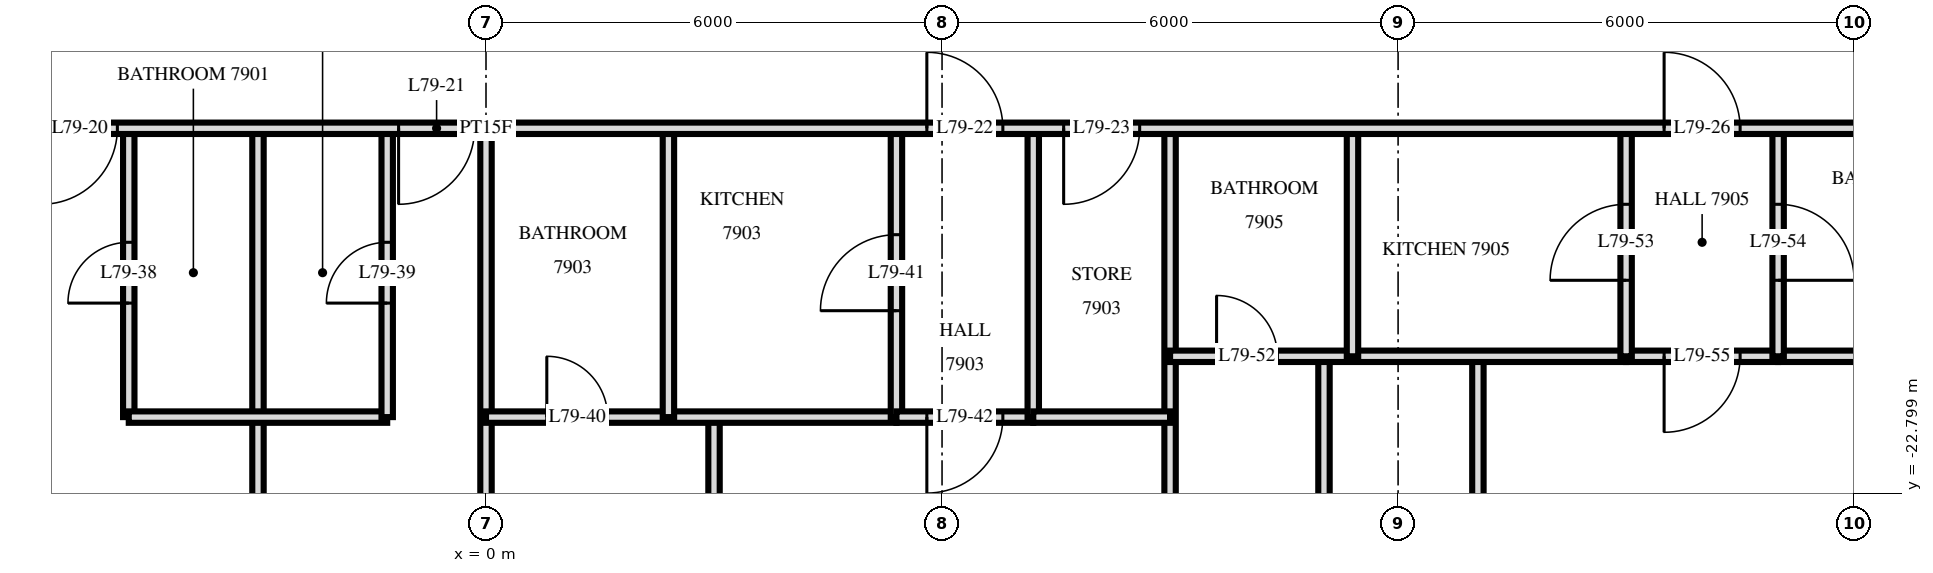
"""IFC4 building model, lengths in metres.
Left out: names, types, materials, properties, quantities, classifications, styles, units other than length and angle.
Written with IfcOpenShell. Run it as: python <this file> out.ifc"""

import sys

from ifc_helpers import new_model, si_unit, direction, frame, frame_2d, origin, place, context, subcontext, project, spatial, rectangle, extrude, element, fill, save


model = new_model("IFC4")
c1 = context("Model", 3, precision=1e-05, world=origin(), true_north=direction((0.0, 1.0)))
c2 = subcontext(c1, "Body", "Model", "MODEL_VIEW")
j1 = project(units=[si_unit("LENGTHUNIT", "METRE"), si_unit("PLANEANGLEUNIT", "RADIAN")], contexts=[c1])
p1 = place(None, origin())
s1 = spatial("IfcSite", under=j1, at=p1, CompositionType="ELEMENT")
p2 = place(p1, origin())
s2 = spatial("IfcBuilding", under=s1, at=p2, CompositionType="ELEMENT")
p3 = place(p2, frame((0.0, 0.0, 298.1)))
s3 = spatial("IfcBuildingStorey", under=s2, at=p3, CompositionType="ELEMENT", Elevation=298.1)
p4 = place(p3, frame((17.0, -21.0, 0.0), z_axis=(0.0, 0.0, 1.0), x_axis=(0.0, 1.0, 0.0)))
e1 = element("IfcWall", 1, at=p4, inside=s3, PredefinedType="PARTITIONING", context=c2, shape_type="SweptSolid", body=[
    extrude(rectangle(XDim=3.0, YDim=0.15, at=frame_2d((1.5, 0.0))), origin(), (0.0, 0.0, 1.0), 3.22),
])
p5 = place(p4, frame((1.0, 0.0, 0.0)))
e2 = element("IfcOpeningElement", 2, at=p5, cuts=e1, PredefinedType="OPENING", context=c2, shape_type="SweptSolid", body=[
    extrude(rectangle(XDim=1.0, YDim=2.1, at=frame_2d((0.5, 1.05))), frame((0.0, 0.085, 0.0), z_axis=(0.0, -1.0, 0.0), x_axis=(1.0, 0.0, 0.0)), (0.0, 0.0, 1.0), 0.17),
])
p6 = place(p3, frame((15.0, -21.0, 0.0), z_axis=(0.0, 0.0, 1.0), x_axis=(0.0, 1.0, 0.0)))
e3 = element("IfcWall", 3, at=p6, inside=s3, PredefinedType="PARTITIONING", context=c2, shape_type="SweptSolid", body=[
    extrude(rectangle(XDim=3.0, YDim=0.15, at=frame_2d((1.5, 0.0))), origin(), (0.0, 0.0, 1.0), 3.22),
])
p7 = place(p6, frame((1.0, 0.0, 0.0)))
e4 = element("IfcOpeningElement", 4, at=p7, cuts=e3, PredefinedType="OPENING", context=c2, shape_type="SweptSolid", body=[
    extrude(rectangle(XDim=1.0, YDim=2.1, at=frame_2d((0.5, 1.05))), frame((0.0, 0.085, 0.0), z_axis=(0.0, -1.0, 0.0), x_axis=(1.0, 0.0, 0.0)), (0.0, 0.0, 1.0), 0.17),
])
p8 = place(p3, frame((13.05, -33.62, 0.0), z_axis=(0.0, 0.0, 1.0), x_axis=(0.0, 1.0, 0.0)))
e5 = element("IfcWall", 5, at=p8, inside=s3, PredefinedType="PARTITIONING", context=c2, shape_type="SweptSolid", body=[
    extrude(rectangle(XDim=12.62, YDim=0.15, at=frame_2d((6.31, 0.0))), origin(), (0.0, 0.0, 1.0), 3.22),
])
p9 = place(p8, frame((5.79, 0.0, 0.0)))
e6 = element("IfcOpeningElement", 6, at=p9, cuts=e5, PredefinedType="OPENING", context=c2, shape_type="SweptSolid", body=[
    extrude(rectangle(XDim=0.9, YDim=2.1, at=frame_2d((0.45, 1.05))), frame((0.0, 0.085, 0.0), z_axis=(0.0, -1.0, 0.0), x_axis=(1.0, 0.0, 0.0)), (0.0, 0.0, 1.0), 0.17),
])
p10 = place(p3, frame((11.4, -21.0, 0.0), z_axis=(0.0, 0.0, 1.0), x_axis=(0.0, 1.0, 0.0)))
e7 = element("IfcWall", 7, at=p10, inside=s3, PredefinedType="PARTITIONING", context=c2, shape_type="SweptSolid", body=[
    extrude(rectangle(XDim=3.0, YDim=0.15, at=frame_2d((1.5, 0.0))), origin(), (0.0, 0.0, 1.0), 3.22),
])
p11 = place(p3, frame((11.025, -33.62, 0.0), z_axis=(0.0, 0.0, 1.0), x_axis=(0.0, 1.0, 0.0)))
e8 = element("IfcWall", 8, at=p11, inside=s3, PredefinedType="PARTITIONING", context=c2, shape_type="SweptSolid", body=[
    extrude(rectangle(XDim=12.62, YDim=0.15, at=frame_2d((6.31, 0.0))), origin(), (0.0, 0.0, 1.0), 3.22),
])
p12 = place(p11, frame((5.79, 0.0, 0.0)))
e9 = element("IfcOpeningElement", 9, at=p12, cuts=e8, PredefinedType="OPENING", context=c2, shape_type="SweptSolid", body=[
    extrude(rectangle(XDim=0.9, YDim=2.1, at=frame_2d((0.45, 1.05))), frame((0.0, 0.085, 0.0), z_axis=(0.0, -1.0, 0.0), x_axis=(1.0, 0.0, 0.0)), (0.0, 0.0, 1.0), 0.17),
])
p13 = place(p3, frame((9.0, -33.62, 0.0), z_axis=(0.0, 0.0, 1.0), x_axis=(0.0, 1.0, 0.0)))
e10 = element("IfcWall", 10, at=p13, inside=s3, PredefinedType="PARTITIONING", context=c2, shape_type="SweptSolid", body=[
    extrude(rectangle(XDim=15.62, YDim=0.15, at=frame_2d((7.81, 0.0))), origin(), (0.0, 0.0, 1.0), 3.22),
])
p14 = place(p3, frame((7.2, -21.8, 0.0), z_axis=(0.0, 0.0, 1.0), x_axis=(0.0, 1.0, 0.0)))
e11 = element("IfcWall", 11, at=p14, inside=s3, PredefinedType="PARTITIONING", context=c2, shape_type="SweptSolid", body=[
    extrude(rectangle(XDim=3.8, YDim=0.15, at=frame_2d((1.9, 0.0))), origin(), (0.0, 0.0, 1.0), 3.22),
])
p15 = place(p3, frame((5.4, -21.8, 0.0), z_axis=(0.0, 0.0, 1.0), x_axis=(0.0, 1.0, 0.0)))
e12 = element("IfcWall", 12, at=p15, inside=s3, PredefinedType="PARTITIONING", context=c2, shape_type="SweptSolid", body=[
    extrude(rectangle(XDim=3.8, YDim=0.15, at=frame_2d((1.9, 0.0))), origin(), (0.0, 0.0, 1.0), 3.22),
])
p16 = place(p15, frame((1.4, 0.0, 0.0)))
e13 = element("IfcOpeningElement", 13, at=p16, cuts=e12, PredefinedType="OPENING", context=c2, shape_type="SweptSolid", body=[
    extrude(rectangle(XDim=1.0, YDim=2.1, at=frame_2d((0.5, 1.05))), frame((0.0, 0.085, 0.0), z_axis=(0.0, -1.0, 0.0), x_axis=(1.0, 0.0, 0.0)), (0.0, 0.0, 1.0), 0.17),
])
p17 = place(p3, frame((3.0, -33.62, 0.0), z_axis=(0.0, 0.0, 1.0), x_axis=(0.0, 1.0, 0.0)))
e14 = element("IfcWall", 14, at=p17, inside=s3, PredefinedType="PARTITIONING", context=c2, shape_type="SweptSolid", body=[
    extrude(rectangle(XDim=11.82, YDim=0.15, at=frame_2d((5.91, 0.0))), origin(), (0.0, 0.0, 1.0), 3.22),
])
p18 = place(p17, frame((5.37, 0.0, 0.0)))
e15 = element("IfcOpeningElement", 15, at=p18, cuts=e14, PredefinedType="OPENING", context=c2, shape_type="SweptSolid", body=[
    extrude(rectangle(XDim=0.9, YDim=2.1, at=frame_2d((0.45, 1.05))), frame((0.0, 0.085, 0.0), z_axis=(0.0, -1.0, 0.0), x_axis=(1.0, 0.0, 0.0)), (0.0, 0.0, 1.0), 0.17),
])
p19 = place(p3, frame((2.4, -21.8, 0.0), z_axis=(0.0, 0.0, 1.0), x_axis=(0.0, 1.0, 0.0)))
e16 = element("IfcWall", 16, at=p19, inside=s3, PredefinedType="PARTITIONING", context=c2, shape_type="SweptSolid", body=[
    extrude(rectangle(XDim=3.8, YDim=0.15, at=frame_2d((1.9, 0.0))), origin(), (0.0, 0.0, 1.0), 3.22),
])
p20 = place(p3, frame((0.0, -33.62, 0.0), z_axis=(0.0, 0.0, 1.0), x_axis=(0.0, 1.0, 0.0)))
e17 = element("IfcWall", 17, at=p20, inside=s3, PredefinedType="PARTITIONING", context=c2, shape_type="SweptSolid", body=[
    extrude(rectangle(XDim=15.62, YDim=0.15, at=frame_2d((7.81, 0.0))), origin(), (0.0, 0.0, 1.0), 3.22),
])
p21 = place(p3, frame((-1.3, -21.8, 0.0), z_axis=(0.0, 0.0, 1.0), x_axis=(0.0, 1.0, 0.0)))
e18 = element("IfcWall", 18, at=p21, inside=s3, PredefinedType="PARTITIONING", context=c2, shape_type="SweptSolid", body=[
    extrude(rectangle(XDim=3.8, YDim=0.15, at=frame_2d((1.9, 0.0))), origin(), (0.0, 0.0, 1.0), 3.22),
])
p22 = place(p21, frame((1.5, 0.0, 0.0)))
e19 = element("IfcOpeningElement", 19, at=p22, cuts=e18, PredefinedType="OPENING", context=c2, shape_type="SweptSolid", body=[
    extrude(rectangle(XDim=0.8, YDim=2.1, at=frame_2d((0.4, 1.05))), frame((0.0, 0.085, 0.0), z_axis=(0.0, -1.0, 0.0), x_axis=(1.0, 0.0, 0.0)), (0.0, 0.0, 1.0), 0.17),
])
p23 = place(p3, frame((-3.0, -33.62, 0.0), z_axis=(0.0, 0.0, 1.0), x_axis=(0.0, 1.0, 0.0)))
e20 = element("IfcWall", 20, at=p23, inside=s3, PredefinedType="PARTITIONING", context=c2, shape_type="SweptSolid", body=[
    extrude(rectangle(XDim=15.62, YDim=0.15, at=frame_2d((7.81, 0.0))), origin(), (0.0, 0.0, 1.0), 3.22),
])
p24 = place(p3, frame((-4.7, -21.8, 0.0), z_axis=(0.0, 0.0, 1.0), x_axis=(0.0, 1.0, 0.0)))
e21 = element("IfcWall", 21, at=p24, inside=s3, PredefinedType="PARTITIONING", context=c2, shape_type="SweptSolid", body=[
    extrude(rectangle(XDim=3.8, YDim=0.15, at=frame_2d((1.9, 0.0))), origin(), (0.0, 0.0, 1.0), 3.22),
])
p25 = place(p24, frame((1.5, 0.0, 0.0)))
e22 = element("IfcOpeningElement", 22, at=p25, cuts=e21, PredefinedType="OPENING", context=c2, shape_type="SweptSolid", body=[
    extrude(rectangle(XDim=0.8, YDim=2.1, at=frame_2d((0.4, 1.05))), frame((0.0, 0.085, 0.0), z_axis=(0.0, -1.0, 0.0), x_axis=(1.0, 0.0, 0.0)), (0.0, 0.0, 1.0), 0.17),
])
p26 = place(p3, frame((5.4, -21.8, 0.0), z_axis=(0.0, 0.0, 1.0), x_axis=(1.0, 0.0, 0.0)))
e23 = element("IfcWall", 23, at=p26, inside=s3, PredefinedType="PARTITIONING", context=c2, shape_type="SweptSolid", body=[
    extrude(rectangle(XDim=1.8, YDim=0.15, at=frame_2d((0.9, 0.0))), origin(), (0.0, 0.0, 1.0), 3.22),
])
p27 = place(p26, frame((0.4, 0.0, 0.0)))
e24 = element("IfcOpeningElement", 24, at=p27, cuts=e23, PredefinedType="OPENING", context=c2, shape_type="SweptSolid", body=[
    extrude(rectangle(XDim=1.0, YDim=2.1, at=frame_2d((0.5, 1.05))), frame((0.0, 0.085, 0.0), z_axis=(0.0, -1.0, 0.0), x_axis=(1.0, 0.0, 0.0)), (0.0, 0.0, 1.0), 0.17),
])
p28 = place(p3, frame((-4.7, -21.8, 0.0), z_axis=(0.0, 0.0, 1.0), x_axis=(1.0, 0.0, 0.0)))
e25 = element("IfcWall", 25, at=p28, inside=s3, PredefinedType="PARTITIONING", context=c2, shape_type="SweptSolid", body=[
    extrude(rectangle(XDim=3.4, YDim=0.15, at=frame_2d((1.7, 0.0))), origin(), (0.0, 0.0, 1.0), 3.22),
])
p29 = place(p3, frame((0.0, -21.8, 0.0), z_axis=(0.0, 0.0, 1.0), x_axis=(1.0, 0.0, 0.0)))
e26 = element("IfcWall", 26, at=p29, inside=s3, PredefinedType="PARTITIONING", context=c2, shape_type="SweptSolid", body=[
    extrude(rectangle(XDim=5.4, YDim=0.15, at=frame_2d((2.7, 0.0))), origin(), (0.0, 0.0, 1.0), 3.22),
])
p30 = place(p29, frame((0.8, 0.0, 0.0)))
e27 = element("IfcOpeningElement", 27, at=p30, cuts=e26, PredefinedType="OPENING", context=c2, shape_type="SweptSolid", body=[
    extrude(rectangle(XDim=0.8, YDim=2.1, at=frame_2d((0.4, 1.05))), frame((0.0, 0.085, 0.0), z_axis=(0.0, -1.0, 0.0), x_axis=(1.0, 0.0, 0.0)), (0.0, 0.0, 1.0), 0.17),
])
p31 = place(p3, frame((7.2, -21.8, 0.0), z_axis=(0.0, 0.0, 1.0), x_axis=(1.0, 0.0, 0.0)))
e28 = element("IfcWall", 28, at=p31, inside=s3, PredefinedType="PARTITIONING", context=c2, shape_type="SweptSolid", body=[
    extrude(rectangle(XDim=1.8, YDim=0.15, at=frame_2d((0.9, 0.0))), origin(), (0.0, 0.0, 1.0), 3.22),
])
p32 = place(p3, frame((15.0, -21.0, 0.0), z_axis=(0.0, 0.0, 1.0), x_axis=(1.0, 0.0, 0.0)))
e29 = element("IfcWall", 29, at=p32, inside=s3, PredefinedType="PARTITIONING", context=c2, shape_type="SweptSolid", body=[
    extrude(rectangle(XDim=2.0, YDim=0.15, at=frame_2d((1.0, 0.0))), origin(), (0.0, 0.0, 1.0), 3.22),
])
p33 = place(p32, frame((0.5, 0.0, 0.0)))
e30 = element("IfcOpeningElement", 30, at=p33, cuts=e29, PredefinedType="OPENING", context=c2, shape_type="SweptSolid", body=[
    extrude(rectangle(XDim=1.0, YDim=2.1, at=frame_2d((0.5, 1.05))), frame((0.0, 0.085, 0.0), z_axis=(0.0, -1.0, 0.0), x_axis=(1.0, 0.0, 0.0)), (0.0, 0.0, 1.0), 0.17),
])
p34 = place(p3, frame((9.0, -21.0, 0.0), z_axis=(0.0, 0.0, 1.0), x_axis=(1.0, 0.0, 0.0)))
e31 = element("IfcWall", 31, at=p34, inside=s3, PredefinedType="PARTITIONING", context=c2, shape_type="SweptSolid", body=[
    extrude(rectangle(XDim=6.0, YDim=0.15, at=frame_2d((3.0, 0.0))), origin(), (0.0, 0.0, 1.0), 3.22),
])
p35 = place(p34, frame((0.612, 0.0, 0.0)))
e32 = element("IfcOpeningElement", 32, at=p35, cuts=e31, PredefinedType="OPENING", context=c2, shape_type="SweptSolid", body=[
    extrude(rectangle(XDim=0.8, YDim=2.1, at=frame_2d((0.4, 1.05))), frame((0.0, 0.085, 0.0), z_axis=(0.0, -1.0, 0.0), x_axis=(1.0, 0.0, 0.0)), (0.0, 0.0, 1.0), 0.17),
])
p36 = place(p3, frame((17.0, -21.0, 0.0), z_axis=(0.0, 0.0, 1.0), x_axis=(1.0, 0.0, 0.0)))
e33 = element("IfcWall", 33, at=p36, inside=s3, PredefinedType="PARTITIONING", context=c2, shape_type="SweptSolid", body=[
    extrude(rectangle(XDim=5.92, YDim=0.15, at=frame_2d((2.96, 0.0))), origin(), (0.0, 0.0, 1.0), 3.22),
])
p37 = place(p3, frame((-22.92, -18.0, 0.0), z_axis=(0.0, 0.0, 1.0), x_axis=(1.0, 0.0, 0.0)))
e34 = element("IfcWall", 34, at=p37, inside=s3, PredefinedType="PARTITIONING", context=c2, shape_type="SweptSolid", body=[
    extrude(rectangle(XDim=45.84, YDim=0.15, at=frame_2d((22.92, 0.0))), origin(), (0.0, 0.0, 1.0), 3.22),
])
p38 = place(p37, frame((17.07, 0.0, 0.0)))
e35 = element("IfcOpeningElement", 35, at=p38, cuts=e34, PredefinedType="OPENING", context=c2, shape_type="SweptSolid", body=[
    extrude(rectangle(XDim=1.0, YDim=2.1, at=frame_2d((0.5, 1.05))), frame((0.0, 0.085, 0.0), z_axis=(0.0, -1.0, 0.0), x_axis=(1.0, 0.0, 0.0)), (0.0, 0.0, 1.0), 0.17),
])
p39 = place(p37, frame((21.77, 0.0, 0.0)))
e36 = element("IfcOpeningElement", 36, at=p39, cuts=e34, PredefinedType="OPENING", context=c2, shape_type="SweptSolid", body=[
    extrude(rectangle(XDim=1.0, YDim=2.1, at=frame_2d((0.5, 1.05))), frame((0.0, 0.085, 0.0), z_axis=(0.0, -1.0, 0.0), x_axis=(1.0, 0.0, 0.0)), (0.0, 0.0, 1.0), 0.17),
])
p40 = place(p37, frame((28.72, 0.0, 0.0)))
e37 = element("IfcOpeningElement", 37, at=p40, cuts=e34, PredefinedType="OPENING", context=c2, shape_type="SweptSolid", body=[
    extrude(rectangle(XDim=1.0, YDim=2.1, at=frame_2d((0.5, 1.05))), frame((0.0, 0.085, 0.0), z_axis=(0.0, -1.0, 0.0), x_axis=(1.0, 0.0, 0.0)), (0.0, 0.0, 1.0), 0.17),
])
p41 = place(p37, frame((30.52, 0.0, 0.0)))
e38 = element("IfcOpeningElement", 38, at=p41, cuts=e34, PredefinedType="OPENING", context=c2, shape_type="SweptSolid", body=[
    extrude(rectangle(XDim=1.0, YDim=2.1, at=frame_2d((0.5, 1.05))), frame((0.0, 0.085, 0.0), z_axis=(0.0, -1.0, 0.0), x_axis=(1.0, 0.0, 0.0)), (0.0, 0.0, 1.0), 0.17),
])
p42 = place(p37, frame((9.42, 0.0, 0.0)))
e39 = element("IfcOpeningElement", 39, at=p42, cuts=e34, PredefinedType="OPENING", context=c2, shape_type="SweptSolid", body=[
    extrude(rectangle(XDim=1.0, YDim=2.1, at=frame_2d((0.5, 1.05))), frame((0.0, 0.085, 0.0), z_axis=(0.0, -1.0, 0.0), x_axis=(1.0, 0.0, 0.0)), (0.0, 0.0, 1.0), 0.17),
])
p43 = place(p37, frame((2.67, 0.0, 0.0)))
e40 = element("IfcOpeningElement", 40, at=p43, cuts=e34, PredefinedType="OPENING", context=c2, shape_type="SweptSolid", body=[
    extrude(rectangle(XDim=1.0, YDim=2.1, at=frame_2d((0.5, 1.05))), frame((0.0, 0.085, 0.0), z_axis=(0.0, -1.0, 0.0), x_axis=(1.0, 0.0, 0.0)), (0.0, 0.0, 1.0), 0.17),
])
p44 = place(p37, frame((38.42, 0.0, 0.0)))
e41 = element("IfcOpeningElement", 41, at=p44, cuts=e34, PredefinedType="OPENING", context=c2, shape_type="SweptSolid", body=[
    extrude(rectangle(XDim=1.0, YDim=2.1, at=frame_2d((0.5, 1.05))), frame((0.0, 0.085, 0.0), z_axis=(0.0, -1.0, 0.0), x_axis=(1.0, 0.0, 0.0)), (0.0, 0.0, 1.0), 0.17),
])
p45 = place(p37, frame((43.67, 0.0, 0.0)))
e42 = element("IfcOpeningElement", 42, at=p45, cuts=e34, PredefinedType="OPENING", context=c2, shape_type="SweptSolid", body=[
    extrude(rectangle(XDim=1.0, YDim=2.1, at=frame_2d((0.5, 1.05))), frame((0.0, 0.085, 0.0), z_axis=(0.0, -1.0, 0.0), x_axis=(1.0, 0.0, 0.0)), (0.0, 0.0, 1.0), 0.17),
])
p46 = place(p38, frame((0.5, 0.0, 0.0), z_axis=(0.0, 0.0, 1.0), x_axis=(-1.0, 0.0, 0.0)))
e43 = element("IfcDoor", 43, at=p46, inside=s3, OperationType="SINGLE_SWING_LEFT", PredefinedType="DOOR", context=c2, shape_type="SweptSolid", body=[
    extrude(rectangle(XDim=1.0, YDim=2.1, at=frame_2d((0.0, 1.05))), frame((0.0, -0.025, 0.0), z_axis=(0.0, 1.0, 0.0), x_axis=(-1.0, 0.0, 0.0)), (0.0, 0.0, 1.0), 0.05),
])
fill(e35, e43)
p47 = place(p39, frame((0.5, 0.0, 0.0), z_axis=(0.0, 0.0, 1.0), x_axis=(-1.0, 0.0, 0.0)))
e44 = element("IfcDoor", 44, at=p47, inside=s3, OperationType="SINGLE_SWING_LEFT", PredefinedType="DOOR", context=c2, shape_type="SweptSolid", body=[
    extrude(rectangle(XDim=1.0, YDim=2.1, at=frame_2d((0.0, 1.05))), frame((0.0, -0.025, 0.0), z_axis=(0.0, 1.0, 0.0), x_axis=(-1.0, 0.0, 0.0)), (0.0, 0.0, 1.0), 0.05),
])
fill(e36, e44)
p48 = place(p40, origin())
e45 = element("IfcDoor", 45, at=p48, inside=s3, OperationType="SINGLE_SWING_RIGHT", PredefinedType="DOOR", context=c2, shape_type="SweptSolid", body=[
    extrude(rectangle(XDim=1.0, YDim=2.1, at=frame_2d((0.5, 1.05))), frame((0.0, 0.025, 0.0), z_axis=(0.0, -1.0, 0.0), x_axis=(1.0, 0.0, 0.0)), (0.0, 0.0, 1.0), 0.05),
])
fill(e37, e45)
p49 = place(p41, frame((0.5, 0.0, 0.0), z_axis=(0.0, 0.0, 1.0), x_axis=(-1.0, 0.0, 0.0)))
e46 = element("IfcDoor", 46, at=p49, inside=s3, OperationType="SINGLE_SWING_LEFT", PredefinedType="DOOR", context=c2, shape_type="SweptSolid", body=[
    extrude(rectangle(XDim=1.0, YDim=2.1, at=frame_2d((0.0, 1.05))), frame((0.0, -0.025, 0.0), z_axis=(0.0, 1.0, 0.0), x_axis=(-1.0, 0.0, 0.0)), (0.0, 0.0, 1.0), 0.05),
])
fill(e38, e46)
p50 = place(p44, origin())
e47 = element("IfcDoor", 47, at=p50, inside=s3, OperationType="SINGLE_SWING_RIGHT", PredefinedType="DOOR", context=c2, shape_type="SweptSolid", body=[
    extrude(rectangle(XDim=1.0, YDim=2.1, at=frame_2d((0.5, 1.05))), frame((0.0, 0.025, 0.0), z_axis=(0.0, -1.0, 0.0), x_axis=(1.0, 0.0, 0.0)), (0.0, 0.0, 1.0), 0.05),
])
fill(e41, e47)
p51 = place(p25, origin())
e48 = element("IfcDoor", 48, at=p51, inside=s3, OperationType="SINGLE_SWING_RIGHT", PredefinedType="DOOR", context=c2, shape_type="SweptSolid", body=[
    extrude(rectangle(XDim=0.8, YDim=2.1, at=frame_2d((0.4, 1.05))), frame((0.0, 0.025, 0.0), z_axis=(0.0, -1.0, 0.0), x_axis=(1.0, 0.0, 0.0)), (0.0, 0.0, 1.0), 0.05),
])
fill(e22, e48)
p52 = place(p22, origin())
e49 = element("IfcDoor", 49, at=p52, inside=s3, OperationType="SINGLE_SWING_RIGHT", PredefinedType="DOOR", context=c2, shape_type="SweptSolid", body=[
    extrude(rectangle(XDim=0.8, YDim=2.1, at=frame_2d((0.4, 1.05))), frame((0.0, 0.025, 0.0), z_axis=(0.0, -1.0, 0.0), x_axis=(1.0, 0.0, 0.0)), (0.0, 0.0, 1.0), 0.05),
])
fill(e19, e49)
p53 = place(p30, origin())
e50 = element("IfcDoor", 50, at=p53, inside=s3, OperationType="SINGLE_SWING_RIGHT", PredefinedType="DOOR", context=c2, shape_type="SweptSolid", body=[
    extrude(rectangle(XDim=0.8, YDim=2.1, at=frame_2d((0.4, 1.05))), frame((0.0, 0.025, 0.0), z_axis=(0.0, -1.0, 0.0), x_axis=(1.0, 0.0, 0.0)), (0.0, 0.0, 1.0), 0.05),
])
fill(e27, e50)
p54 = place(p16, origin())
e51 = element("IfcDoor", 51, at=p54, inside=s3, OperationType="SINGLE_SWING_RIGHT", PredefinedType="DOOR", context=c2, shape_type="SweptSolid", body=[
    extrude(rectangle(XDim=1.0, YDim=2.1, at=frame_2d((0.5, 1.05))), frame((0.0, 0.025, 0.0), z_axis=(0.0, -1.0, 0.0), x_axis=(1.0, 0.0, 0.0)), (0.0, 0.0, 1.0), 0.05),
])
fill(e13, e51)
p55 = place(p27, frame((0.5, 0.0, 0.0), z_axis=(0.0, 0.0, 1.0), x_axis=(-1.0, 0.0, 0.0)))
e52 = element("IfcDoor", 52, at=p55, inside=s3, OperationType="SINGLE_SWING_LEFT", PredefinedType="DOOR", context=c2, shape_type="SweptSolid", body=[
    extrude(rectangle(XDim=1.0, YDim=2.1, at=frame_2d((0.0, 1.05))), frame((0.0, -0.025, 0.0), z_axis=(0.0, 1.0, 0.0), x_axis=(-1.0, 0.0, 0.0)), (0.0, 0.0, 1.0), 0.05),
])
fill(e24, e52)
p56 = place(p35, origin())
e53 = element("IfcDoor", 53, at=p56, inside=s3, OperationType="SINGLE_SWING_RIGHT", PredefinedType="DOOR", context=c2, shape_type="SweptSolid", body=[
    extrude(rectangle(XDim=0.8, YDim=2.1, at=frame_2d((0.4, 1.05))), frame((0.0, 0.025, 0.0), z_axis=(0.0, -1.0, 0.0), x_axis=(1.0, 0.0, 0.0)), (0.0, 0.0, 1.0), 0.05),
])
fill(e32, e53)
p57 = place(p7, origin())
e54 = element("IfcDoor", 54, at=p57, inside=s3, OperationType="SINGLE_SWING_RIGHT", PredefinedType="DOOR", context=c2, shape_type="SweptSolid", body=[
    extrude(rectangle(XDim=1.0, YDim=2.1, at=frame_2d((0.5, 1.05))), frame((0.0, 0.025, 0.0), z_axis=(0.0, -1.0, 0.0), x_axis=(1.0, 0.0, 0.0)), (0.0, 0.0, 1.0), 0.05),
])
fill(e4, e54)
p58 = place(p5, frame((0.5, 0.0, 0.0), z_axis=(0.0, 0.0, 1.0), x_axis=(-1.0, 0.0, 0.0)))
e55 = element("IfcDoor", 55, at=p58, inside=s3, OperationType="SINGLE_SWING_LEFT", PredefinedType="DOOR", context=c2, shape_type="SweptSolid", body=[
    extrude(rectangle(XDim=1.0, YDim=2.1, at=frame_2d((0.0, 1.05))), frame((0.0, -0.025, 0.0), z_axis=(0.0, 1.0, 0.0), x_axis=(-1.0, 0.0, 0.0)), (0.0, 0.0, 1.0), 0.05),
])
fill(e2, e55)
p59 = place(p33, frame((0.5, 0.0, 0.0), z_axis=(0.0, 0.0, 1.0), x_axis=(-1.0, 0.0, 0.0)))
e56 = element("IfcDoor", 56, at=p59, inside=s3, OperationType="SINGLE_SWING_LEFT", PredefinedType="DOOR", context=c2, shape_type="SweptSolid", body=[
    extrude(rectangle(XDim=1.0, YDim=2.1, at=frame_2d((0.0, 1.05))), frame((0.0, -0.025, 0.0), z_axis=(0.0, 1.0, 0.0), x_axis=(-1.0, 0.0, 0.0)), (0.0, 0.0, 1.0), 0.05),
])
fill(e30, e56)
save(model, sys.argv[1])
